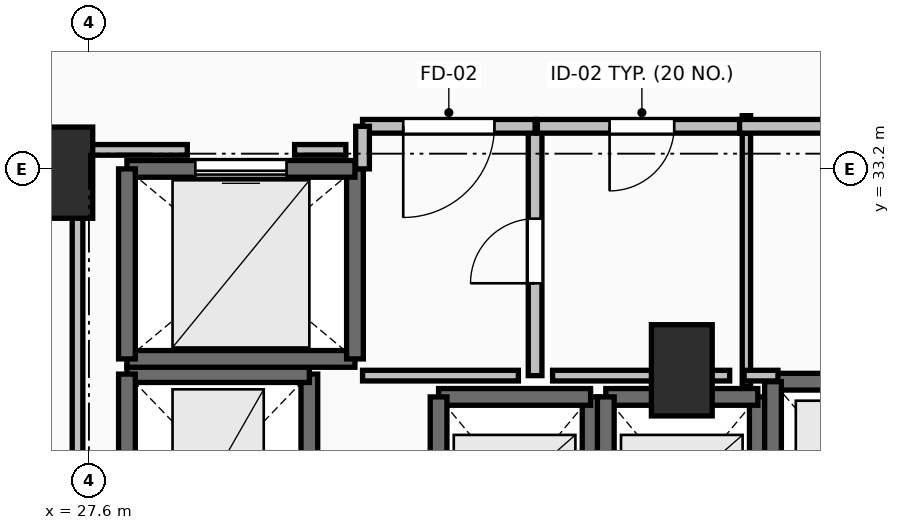
"""IFC4 building model, lengths in metres.
Left out: names, types, materials, properties, quantities, classifications, styles, units other than length and angle.
Written with IfcOpenShell. Run it as: python <this file> out.ifc"""

import sys

from ifc_helpers import new_model, si_unit, direction, frame, frame_2d, origin, origin_2d, place, context, subcontext, project, spatial, rectangle, extrude, element, fill, save


model = new_model("IFC4")
c1 = context("Model", 3, precision=1e-05, world=origin(), true_north=direction((0.0, 1.0)))
c2 = subcontext(c1, "Body", "Model", "MODEL_VIEW")
j1 = project(units=[si_unit("LENGTHUNIT", "METRE"), si_unit("PLANEANGLEUNIT", "RADIAN")], contexts=[c1])
p1 = place(None, origin())
s1 = spatial("IfcSite", under=j1, at=p1, CompositionType="ELEMENT")
p2 = place(p1, origin())
s2 = spatial("IfcBuilding", under=s1, at=p2, CompositionType="ELEMENT")
p3 = place(p2, frame((0.0, 0.0, 24.0)))
s3 = spatial("IfcBuildingStorey", under=s2, at=p3, CompositionType="ELEMENT", Elevation=24.0)
for number, where, z_axis, x_axis in (
    (1, (27.25, 33.15, 0.0), (0.0, 0.0, 1.0), (1.0, 0.0, 0.0)),
    (2, (35.4, 30.55, 0.0), (0.0, 0.0, 1.0), (1.0, 0.0, 0.0)),
):
    element("IfcColumn", number, at=place(p3, frame(where, z_axis=z_axis, x_axis=x_axis)), inside=s3, PredefinedType="PILASTER", context=c2, shape_type="SweptSolid", body=[
        extrude(rectangle(XDim=0.8, YDim=1.2, at=origin_2d()), origin(), (0.0, 0.0, 1.0), 3.5),
    ])
p4 = place(p3, frame((34.2, 27.8, 0.0), z_axis=(0.0, 0.0, 1.0), x_axis=(0.0, 1.0, 0.0)))
e3 = element("IfcWall", 3, at=p4, inside=s3, PredefinedType="SOLIDWALL", context=c2, shape_type="SweptSolid", body=[
    extrude(rectangle(XDim=2.4, YDim=0.22, at=frame_2d((1.2, 0.0))), origin(), (0.0, 0.0, 1.0), 3.24),
])
p5 = place(p3, frame((34.2, 30.2, 0.0), z_axis=(0.0, 0.0, 1.0), x_axis=(-1.0, 0.0, 0.0)))
e4 = element("IfcWall", 4, at=p5, inside=s3, PredefinedType="SOLIDWALL", context=c2, shape_type="SweptSolid", body=[
    extrude(rectangle(XDim=2.0, YDim=0.22, at=frame_2d((1.0, 0.0))), origin(), (0.0, 0.0, 1.0), 3.24),
])
for number, where, z_axis, x_axis in (
    (5, (32.2, 30.2, 0.0), (0.0, 0.0, 1.0), (0.0, -1.0, 0.0)),
    (6, (36.4, 27.8, 0.0), (0.0, 0.0, 1.0), (0.0, 1.0, 0.0)),
):
    element("IfcWall", number, at=place(p3, frame(where, z_axis=z_axis, x_axis=x_axis)), inside=s3, PredefinedType="SOLIDWALL", context=c2, shape_type="SweptSolid", body=[
        extrude(rectangle(XDim=2.4, YDim=0.22, at=frame_2d((1.2, 0.0))), origin(), (0.0, 0.0, 1.0), 3.24),
    ])
p6 = place(p3, frame((36.4, 30.2, 0.0), z_axis=(0.0, 0.0, 1.0), x_axis=(-1.0, 0.0, 0.0)))
e7 = element("IfcWall", 7, at=p6, inside=s3, PredefinedType="SOLIDWALL", context=c2, shape_type="SweptSolid", body=[
    extrude(rectangle(XDim=2.0, YDim=0.22, at=frame_2d((1.0, 0.0))), origin(), (0.0, 0.0, 1.0), 3.24),
])
p7 = place(p3, frame((34.4, 30.2, 0.0), z_axis=(0.0, 0.0, 1.0), x_axis=(0.0, -1.0, 0.0)))
e8 = element("IfcWall", 8, at=p7, inside=s3, PredefinedType="SOLIDWALL", context=c2, shape_type="SweptSolid", body=[
    extrude(rectangle(XDim=2.4, YDim=0.22, at=frame_2d((1.2, 0.0))), origin(), (0.0, 0.0, 1.0), 3.24),
])
p8 = place(p3, frame((38.8, 30.4, 0.0), z_axis=(0.0, 0.0, 1.0), x_axis=(-1.0, 0.0, 0.0)))
e9 = element("IfcWall", 9, at=p8, inside=s3, PredefinedType="SOLIDWALL", context=c2, shape_type="SweptSolid", body=[
    extrude(rectangle(XDim=2.2, YDim=0.22, at=frame_2d((1.1, 0.0))), origin(), (0.0, 0.0, 1.0), 3.24),
])
p9 = place(p3, frame((36.6, 30.4, 0.0), z_axis=(0.0, 0.0, 1.0), x_axis=(0.0, -1.0, 0.0)))
e10 = element("IfcWall", 10, at=p9, inside=s3, PredefinedType="SOLIDWALL", context=c2, shape_type="SweptSolid", body=[
    extrude(rectangle(XDim=2.6, YDim=0.22, at=frame_2d((1.3, 0.0))), origin(), (0.0, 0.0, 1.0), 3.24),
])
p10 = place(p3, frame((30.5, 28.0, 0.0), z_axis=(0.0, 0.0, 1.0), x_axis=(0.0, 1.0, 0.0)))
e11 = element("IfcWall", 11, at=p10, inside=s3, PredefinedType="SHEAR", context=c2, shape_type="SweptSolid", body=[
    extrude(rectangle(XDim=2.5, YDim=0.22, at=frame_2d((1.25, 0.0))), origin(), (0.0, 0.0, 1.0), 3.24),
])
p11 = place(p3, frame((30.5, 30.5, 0.0), z_axis=(0.0, 0.0, 1.0), x_axis=(-1.0, 0.0, 0.0)))
e12 = element("IfcWall", 12, at=p11, inside=s3, PredefinedType="SHEAR", context=c2, shape_type="SweptSolid", body=[
    extrude(rectangle(XDim=2.4, YDim=0.22, at=frame_2d((1.2, 0.0))), origin(), (0.0, 0.0, 1.0), 3.24),
])
p12 = place(p3, frame((28.1, 30.5, 0.0), z_axis=(0.0, 0.0, 1.0), x_axis=(0.0, -1.0, 0.0)))
e13 = element("IfcWall", 13, at=p12, inside=s3, PredefinedType="SHEAR", context=c2, shape_type="SweptSolid", body=[
    extrude(rectangle(XDim=2.5, YDim=0.22, at=frame_2d((1.25, 0.0))), origin(), (0.0, 0.0, 1.0), 3.24),
])
p13 = place(p3, frame((28.1, 30.7, 0.0), z_axis=(0.0, 0.0, 1.0), x_axis=(1.0, 0.0, 0.0)))
e14 = element("IfcWall", 14, at=p13, inside=s3, PredefinedType="SOLIDWALL", context=c2, shape_type="SweptSolid", body=[
    extrude(rectangle(XDim=3.0, YDim=0.22, at=frame_2d((1.5, 0.0))), origin(), (0.0, 0.0, 1.0), 3.24),
])
p14 = place(p3, frame((31.1, 30.7, 0.0), z_axis=(0.0, 0.0, 1.0), x_axis=(0.0, 1.0, 0.0)))
e15 = element("IfcWall", 15, at=p14, inside=s3, PredefinedType="SOLIDWALL", context=c2, shape_type="SweptSolid", body=[
    extrude(rectangle(XDim=2.5, YDim=0.22, at=frame_2d((1.25, 0.0))), origin(), (0.0, 0.0, 1.0), 3.24),
])
p15 = place(p3, frame((31.1, 33.2, 0.0), z_axis=(0.0, 0.0, 1.0), x_axis=(-1.0, 0.0, 0.0)))
e16 = element("IfcWall", 16, at=p15, inside=s3, PredefinedType="SOLIDWALL", context=c2, shape_type="SweptSolid", body=[
    extrude(rectangle(XDim=3.0, YDim=0.22, at=frame_2d((1.5, 0.0))), origin(), (0.0, 0.0, 1.0), 3.24),
])
p16 = place(p15, frame((0.9, 0.0, 0.0)))
e17 = element("IfcOpeningElement", 17, at=p16, cuts=e16, PredefinedType="OPENING", context=c2, shape_type="SweptSolid", body=[
    extrude(rectangle(XDim=1.2, YDim=2.2, at=frame_2d((0.6, 1.1))), frame((0.0, 0.125, 0.0), z_axis=(0.0, -1.0, 0.0), x_axis=(1.0, 0.0, 0.0)), (0.0, 0.0, 1.0), 0.25),
])
p17 = place(p3, frame((28.1, 33.2, 0.0), z_axis=(0.0, 0.0, 1.0), x_axis=(0.0, -1.0, 0.0)))
e18 = element("IfcWall", 18, at=p17, inside=s3, PredefinedType="SOLIDWALL", context=c2, shape_type="SweptSolid", body=[
    extrude(rectangle(XDim=2.5, YDim=0.22, at=frame_2d((1.25, 0.0))), origin(), (0.0, 0.0, 1.0), 3.24),
])
p18 = place(p3, frame((33.47, 30.48, 0.0), z_axis=(0.0, 0.0, 1.0), x_axis=(0.0, 1.0, 0.0)))
e19 = element("IfcWall", 19, at=p18, inside=s3, PredefinedType="PARTITIONING", context=c2, shape_type="SweptSolid", body=[
    extrude(rectangle(XDim=3.28, YDim=0.18, at=frame_2d((1.64, 0.0))), origin(), (0.0, 0.0, 1.0), 3.24),
])
p19 = place(p18, frame((1.215, 0.0, 0.0)))
e20 = element("IfcOpeningElement", 20, at=p19, cuts=e19, PredefinedType="OPENING", context=c2, shape_type="SweptSolid", body=[
    extrude(rectangle(XDim=0.85, YDim=2.1, at=frame_2d((0.425, 1.05))), frame((0.0, 0.105, 0.0), z_axis=(0.0, -1.0, 0.0), x_axis=(1.0, 0.0, 0.0)), (0.0, 0.0, 1.0), 0.21),
])
p20 = place(p3, frame((33.47, 33.76, 0.0), z_axis=(0.0, 0.0, 1.0), x_axis=(-1.0, 0.0, 0.0)))
e21 = element("IfcWall", 21, at=p20, inside=s3, PredefinedType="PARTITIONING", context=c2, shape_type="SweptSolid", body=[
    extrude(rectangle(XDim=2.27, YDim=0.18, at=frame_2d((1.135, 0.0))), origin(), (0.0, 0.0, 1.0), 3.24),
])
p21 = place(p20, frame((0.535, 0.0, 0.0)))
e22 = element("IfcOpeningElement", 22, at=p21, cuts=e21, PredefinedType="OPENING", context=c2, shape_type="SweptSolid", body=[
    extrude(rectangle(XDim=1.2, YDim=2.15, at=frame_2d((0.6, 1.075))), frame((0.0, 0.105, 0.0), z_axis=(0.0, -1.0, 0.0), x_axis=(1.0, 0.0, 0.0)), (0.0, 0.0, 1.0), 0.21),
])
p22 = place(p3, frame((31.2, 33.76, 0.0), z_axis=(0.0, 0.0, 1.0), x_axis=(0.0, -1.0, 0.0)))
e23 = element("IfcWall", 23, at=p22, inside=s3, PredefinedType="PARTITIONING", context=c2, shape_type="SweptSolid", body=[
    extrude(rectangle(XDim=0.56, YDim=0.18, at=frame_2d((0.28, 0.0))), origin(), (0.0, 0.0, 1.0), 3.24),
])
p23 = place(p3, frame((36.25, 30.34, 0.0), z_axis=(0.0, 0.0, 1.0), x_axis=(0.0, 1.0, 0.0)))
e24 = element("IfcWall", 24, at=p23, inside=s3, PredefinedType="PARTITIONING", context=c2, shape_type="SweptSolid", body=[
    extrude(rectangle(XDim=3.56, YDim=0.11, at=frame_2d((1.78, 0.0))), origin(), (0.0, 0.0, 1.0), 2.432),
])
p24 = place(p3, frame((36.25, 33.76, 0.0), z_axis=(0.0, 0.0, 1.0), x_axis=(-1.0, 0.0, 0.0)))
e25 = element("IfcWall", 25, at=p24, inside=s3, PredefinedType="PARTITIONING", context=c2, shape_type="SweptSolid", body=[
    extrude(rectangle(XDim=2.75, YDim=0.18, at=frame_2d((1.375, 0.0))), origin(), (0.0, 0.0, 1.0), 3.24),
])
p25 = place(p24, frame((0.95, 0.0, 0.0)))
e26 = element("IfcOpeningElement", 26, at=p25, cuts=e25, PredefinedType="OPENING", context=c2, shape_type="SweptSolid", body=[
    extrude(rectangle(XDim=0.85, YDim=2.1, at=frame_2d((0.425, 1.05))), frame((0.0, 0.105, 0.0), z_axis=(0.0, -1.0, 0.0), x_axis=(1.0, 0.0, 0.0)), (0.0, 0.0, 1.0), 0.21),
])
p26 = place(p3, frame((39.79, 33.76, 0.0), z_axis=(0.0, 0.0, 1.0), x_axis=(-1.0, 0.0, 0.0)))
e27 = element("IfcWall", 27, at=p26, inside=s3, PredefinedType="PARTITIONING", context=c2, shape_type="SweptSolid", body=[
    extrude(rectangle(XDim=3.63, YDim=0.18, at=frame_2d((1.815, 0.0))), origin(), (0.0, 0.0, 1.0), 3.24),
])
p27 = place(p26, frame((1.39, 0.0, 0.0)))
e28 = element("IfcOpeningElement", 28, at=p27, cuts=e27, PredefinedType="OPENING", context=c2, shape_type="SweptSolid", body=[
    extrude(rectangle(XDim=0.85, YDim=2.1, at=frame_2d((0.425, 1.05))), frame((0.0, 0.105, 0.0), z_axis=(0.0, -1.0, 0.0), x_axis=(1.0, 0.0, 0.0)), (0.0, 0.0, 1.0), 0.21),
])
p28 = place(p3, frame((31.2, 30.48, 0.0), z_axis=(0.0, 0.0, 1.0), x_axis=(1.0, 0.0, 0.0)))
e29 = element("IfcWall", 29, at=p28, inside=s3, PredefinedType="PARTITIONING", context=c2, shape_type="SweptSolid", body=[
    extrude(rectangle(XDim=2.05, YDim=0.14, at=frame_2d((1.025, 0.0))), origin(), (0.0, 0.0, 1.0), 3.24),
])
p29 = place(p3, frame((33.7, 30.48, 0.0), z_axis=(0.0, 0.0, 1.0), x_axis=(1.0, 0.0, 0.0)))
e30 = element("IfcWall", 30, at=p29, inside=s3, PredefinedType="PARTITIONING", context=c2, shape_type="SweptSolid", body=[
    extrude(rectangle(XDim=2.33, YDim=0.14, at=frame_2d((1.165, 0.0))), origin(), (0.0, 0.0, 1.0), 2.432),
])
p30 = place(p3, frame((36.22, 30.48, 0.0), z_axis=(0.0, 0.0, 1.0), x_axis=(1.0, 0.0, 0.0)))
e31 = element("IfcWall", 31, at=p30, inside=s3, PredefinedType="PARTITIONING", context=c2, shape_type="SweptSolid", body=[
    extrude(rectangle(XDim=0.445, YDim=0.14, at=frame_2d((0.223, 0.0))), origin(), (0.0, 0.0, 1.0), 2.432),
])
p31 = place(p3, frame((27.45, 28.196, 0.0), z_axis=(0.0, 0.0, 1.0), x_axis=(0.0, 1.0, 0.0)))
e32 = element("IfcWall", 32, at=p31, inside=s3, PredefinedType="PARTITIONING", context=c2, shape_type="SweptSolid", body=[
    extrude(rectangle(XDim=5.254, YDim=0.14, at=frame_2d((2.627, 0.0))), origin(), (0.0, 0.0, 1.0), 2.432),
])
p32 = place(p3, frame((27.45, 33.45, 0.0), z_axis=(0.0, 0.0, 1.0), x_axis=(1.0, 0.0, 0.0)))
e33 = element("IfcWall", 33, at=p32, inside=s3, PredefinedType="PARTITIONING", context=c2, shape_type="SweptSolid", body=[
    extrude(rectangle(XDim=1.444, YDim=0.14, at=frame_2d((0.722, 0.0))), origin(), (0.0, 0.0, 1.0), 2.432),
])
p33 = place(p3, frame((30.306, 33.45, 0.0), z_axis=(0.0, 0.0, 1.0), x_axis=(1.0, 0.0, 0.0)))
e34 = element("IfcWall", 34, at=p33, inside=s3, PredefinedType="PARTITIONING", context=c2, shape_type="SweptSolid", body=[
    extrude(rectangle(XDim=0.674, YDim=0.14, at=frame_2d((0.337, 0.0))), origin(), (0.0, 0.0, 1.0), 3.24),
])
p34 = place(p16, origin())
e35 = element("IfcDoor", 35, at=p34, inside=s3, OperationType="SLIDING_TO_LEFT", PredefinedType="DOOR", context=c2, shape_type="SweptSolid", body=[
    extrude(rectangle(XDim=1.2, YDim=2.2, at=frame_2d((0.6, 1.1))), frame((0.0, 0.025, 0.0), z_axis=(0.0, -1.0, 0.0), x_axis=(1.0, 0.0, 0.0)), (0.0, 0.0, 1.0), 0.05),
])
fill(e17, e35)
p35 = place(p19, origin())
e36 = element("IfcDoor", 36, at=p35, inside=s3, OperationType="SINGLE_SWING_LEFT", PredefinedType="DOOR", context=c2, shape_type="SweptSolid", body=[
    extrude(rectangle(XDim=0.85, YDim=2.1, at=frame_2d((0.425, 1.05))), frame((0.0, 0.025, 0.0), z_axis=(0.0, -1.0, 0.0), x_axis=(1.0, 0.0, 0.0)), (0.0, 0.0, 1.0), 0.05),
])
fill(e20, e36)
p36 = place(p21, origin())
e37 = element("IfcDoor", 37, at=p36, inside=s3, OperationType="SINGLE_SWING_RIGHT", PredefinedType="DOOR", context=c2, shape_type="SweptSolid", body=[
    extrude(rectangle(XDim=1.2, YDim=2.15, at=frame_2d((0.6, 1.075))), frame((0.0, 0.025, 0.0), z_axis=(0.0, -1.0, 0.0), x_axis=(1.0, 0.0, 0.0)), (0.0, 0.0, 1.0), 0.05),
])
fill(e22, e37)
p37 = place(p25, origin())
e38 = element("IfcDoor", 38, at=p37, inside=s3, OperationType="SINGLE_SWING_RIGHT", PredefinedType="DOOR", context=c2, shape_type="SweptSolid", body=[
    extrude(rectangle(XDim=0.85, YDim=2.1, at=frame_2d((0.425, 1.05))), frame((0.0, 0.025, 0.0), z_axis=(0.0, -1.0, 0.0), x_axis=(1.0, 0.0, 0.0)), (0.0, 0.0, 1.0), 0.05),
])
fill(e26, e38)
save(model, sys.argv[1])
